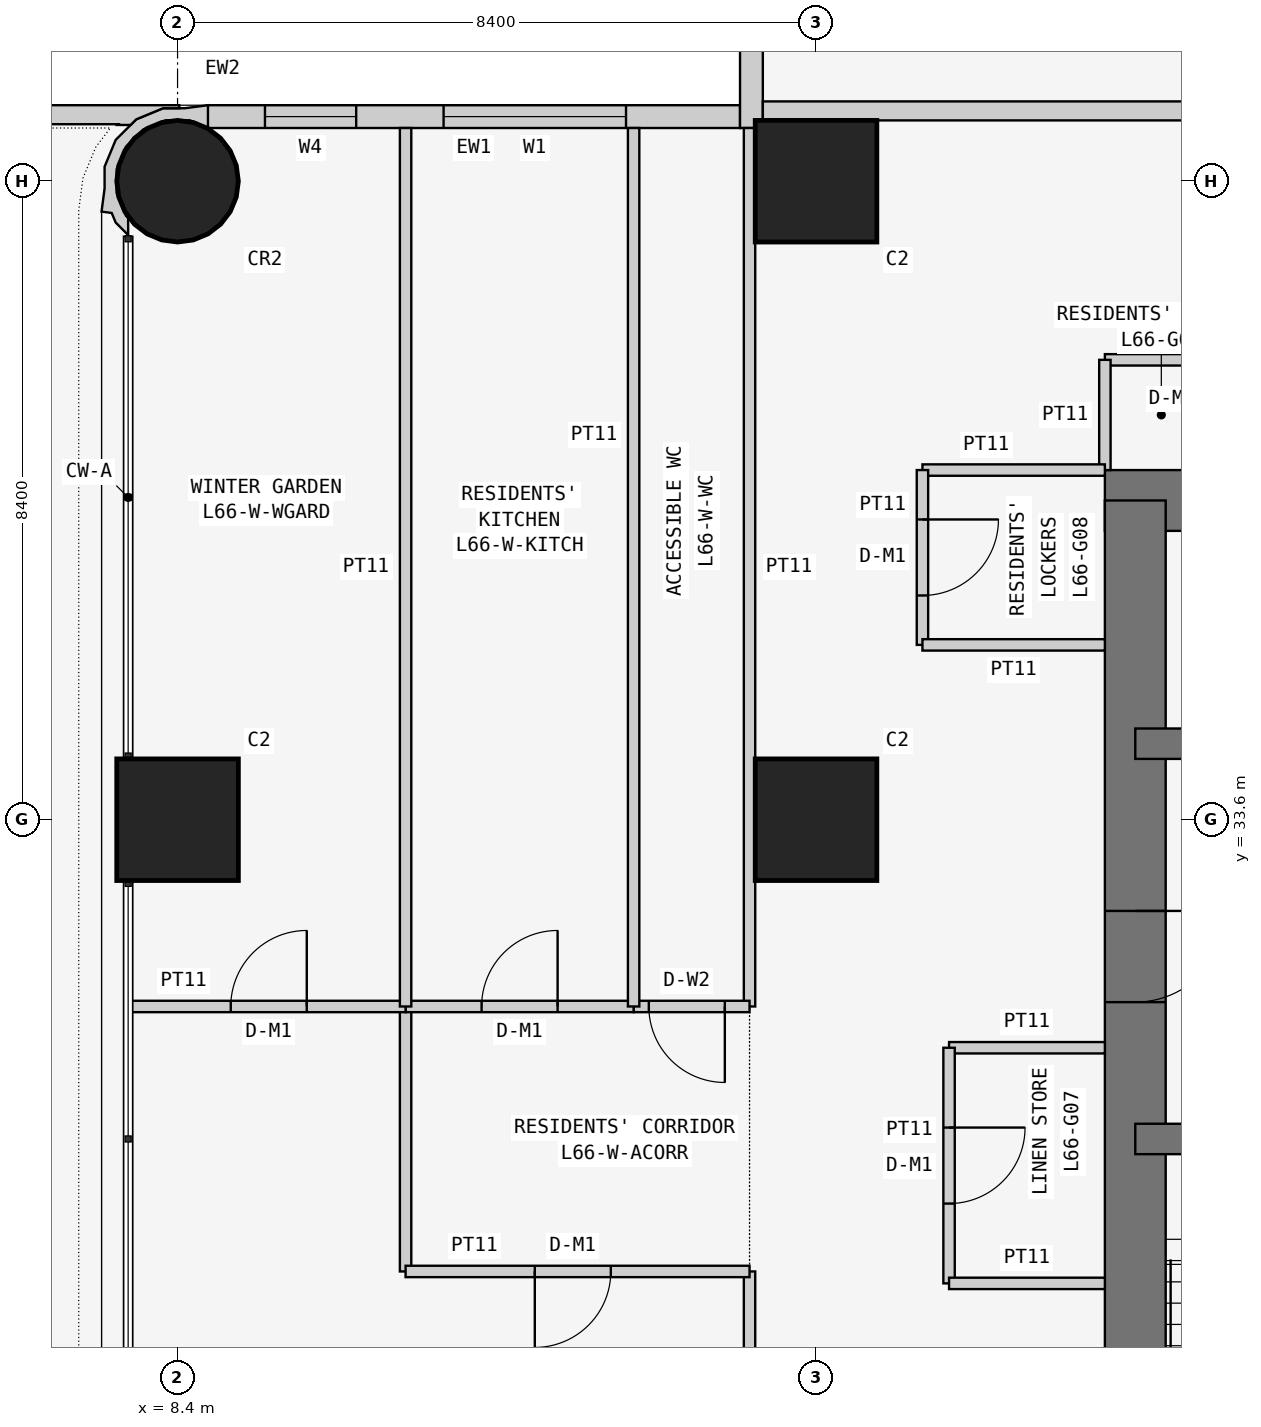
"""IFC4 building model, lengths in metres.
Left out: names, types, materials, properties, quantities, classifications, styles, units other than length and angle.
Written with IfcOpenShell. Run it as: python <this file> out.ifc"""

import sys

from ifc_helpers import new_model, si_unit, direction, frame, frame_2d, origin, origin_2d, place, context, subcontext, project, spatial, polyline, rectangle, circle, outline, extrude, element, fill, save


model = new_model("IFC4")
c1 = context("Model", 3, precision=1e-05, world=origin(), true_north=direction((0.0, 1.0)))
c2 = subcontext(c1, "Body", "Model", "MODEL_VIEW")
j1 = project(units=[si_unit("LENGTHUNIT", "METRE"), si_unit("PLANEANGLEUNIT", "RADIAN")], contexts=[c1])
p1 = place(None, origin())
s1 = spatial("IfcSite", under=j1, at=p1, CompositionType="ELEMENT")
p2 = place(p1, origin())
s2 = spatial("IfcBuilding", under=s1, at=p2, CompositionType="ELEMENT")
p3 = place(p2, frame((0.0, 0.0, 254.1)))
s3 = spatial("IfcBuildingStorey", under=s2, at=p3, CompositionType="ELEMENT", Elevation=254.1)
p4 = place(p3, frame((8.4, 33.6, 0.0), z_axis=(0.0, 0.0, 1.0), x_axis=(1.0, 0.0, 0.0)))
e1 = element("IfcColumn", 1, at=p4, inside=s3, PredefinedType="COLUMN", context=c2, shape_type="SweptSolid", body=[
    extrude(rectangle(XDim=1.6, YDim=1.6, at=origin_2d()), origin(), (0.0, 0.0, 1.0), 3.6),
])
p5 = place(p3, frame((8.4, 42.0, 0.0), z_axis=(0.0, 0.0, 1.0), x_axis=(1.0, 0.0, 0.0)))
e2 = element("IfcColumn", 2, at=p5, inside=s3, PredefinedType="COLUMN", context=c2, shape_type="SweptSolid", body=[
    extrude(circle(Radius=0.8, at=origin_2d()), origin(), (0.0, 0.0, 1.0), 3.6),
])
for number, where, z_axis, x_axis in (
    (3, (16.8, 33.6, 0.0), (0.0, 0.0, 1.0), (1.0, 0.0, 0.0)),
    (4, (16.8, 42.0, 0.0), (0.0, 0.0, 1.0), (1.0, 0.0, 0.0)),
):
    element("IfcColumn", number, at=place(p3, frame(where, z_axis=z_axis, x_axis=x_axis)), inside=s3, PredefinedType="COLUMN", context=c2, shape_type="SweptSolid", body=[
        extrude(rectangle(XDim=1.6, YDim=1.6, at=origin_2d()), origin(), (0.0, 0.0, 1.0), 3.6),
    ])
p6 = place(p3, frame((37.8, 37.8, 0.0), z_axis=(0.0, 0.0, 1.0), x_axis=(-1.0, 0.0, 0.0)))
e5 = element("IfcWall", 5, at=p6, inside=s3, PredefinedType="SHEAR", context=c2, shape_type="SweptSolid", body=[
    extrude(rectangle(XDim=17.2, YDim=0.8, at=frame_2d((8.6, 0.0))), origin(), (0.0, 0.0, 1.0), 3.6),
])
p7 = place(p3, frame((21.0, 37.8, 0.0), z_axis=(0.0, 0.0, 1.0), x_axis=(0.0, -1.0, 0.0)))
e6 = element("IfcWall", 6, at=p7, inside=s3, PredefinedType="SHEAR", context=c2, shape_type="SweptSolid", body=[
    extrude(rectangle(XDim=17.2, YDim=0.8, at=frame_2d((8.6, 0.0))), origin(), (0.0, 0.0, 1.0), 3.6),
])
p8 = place(p7, frame((5.4, 0.0, 0.0)))
e7 = element("IfcOpeningElement", 7, at=p8, cuts=e6, PredefinedType="OPENING", context=c2, shape_type="SweptSolid", body=[
    extrude(rectangle(XDim=1.2, YDim=2.1, at=frame_2d((0.6, 1.05))), frame((0.0, 0.41, 0.0), z_axis=(0.0, -1.0, 0.0), x_axis=(1.0, 0.0, 0.0)), (0.0, 0.0, 1.0), 0.82),
])
p9 = place(p3, frame((21.0, 29.4, 0.0), z_axis=(0.0, 0.0, 1.0), x_axis=(1.0, 0.0, 0.0)))
e8 = element("IfcWall", 8, at=p9, inside=s3, PredefinedType="SHEAR", context=c2, shape_type="SweptSolid", body=[
    extrude(rectangle(XDim=5.6, YDim=0.4, at=frame_2d((2.8, 0.0))), origin(), (0.0, 0.0, 1.0), 3.6),
])
p10 = place(p9, frame((2.3, 0.0, 0.0)))
e9 = element("IfcOpeningElement", 9, at=p10, cuts=e8, PredefinedType="OPENING", context=c2, shape_type="SweptSolid", body=[
    extrude(rectangle(XDim=1.2, YDim=2.1, at=frame_2d((0.6, 1.05))), frame((0.0, 0.21, 0.0), z_axis=(0.0, -1.0, 0.0), x_axis=(1.0, 0.0, 0.0)), (0.0, 0.0, 1.0), 0.42),
])
p11 = place(p3, frame((21.0, 34.6, 0.0), z_axis=(0.0, 0.0, 1.0), x_axis=(1.0, 0.0, 0.0)))
e10 = element("IfcWall", 10, at=p11, inside=s3, PredefinedType="SHEAR", context=c2, shape_type="SweptSolid", body=[
    extrude(rectangle(XDim=11.2, YDim=0.4, at=frame_2d((5.6, 0.0))), origin(), (0.0, 0.0, 1.0), 3.6),
])
p12 = place(p11, frame((9.35, 0.0, 0.0)))
e11 = element("IfcOpeningElement", 11, at=p12, cuts=e10, PredefinedType="OPENING", context=c2, shape_type="SweptSolid", body=[
    extrude(rectangle(XDim=0.9, YDim=2.1, at=frame_2d((0.45, 1.05))), frame((0.0, 0.21, 0.0), z_axis=(0.0, -1.0, 0.0), x_axis=(1.0, 0.0, 0.0)), (0.0, 0.0, 1.0), 0.42),
])
p13 = place(p11, frame((1.0, 0.0, 0.0)))
e12 = element("IfcOpeningElement", 12, at=p13, cuts=e10, PredefinedType="OPENING", context=c2, shape_type="SweptSolid", body=[
    extrude(rectangle(XDim=1.1, YDim=2.1, at=frame_2d((0.55, 1.05))), frame((0.0, 0.21, 0.0), z_axis=(0.0, -1.0, 0.0), x_axis=(1.0, 0.0, 0.0)), (0.0, 0.0, 1.0), 0.42),
])
p14 = place(p11, frame((3.65, 0.0, 0.0)))
e13 = element("IfcOpeningElement", 13, at=p14, cuts=e10, PredefinedType="OPENING", context=c2, shape_type="SweptSolid", body=[
    extrude(rectangle(XDim=1.1, YDim=2.1, at=frame_2d((0.55, 1.05))), frame((0.0, 0.21, 0.0), z_axis=(0.0, -1.0, 0.0), x_axis=(1.0, 0.0, 0.0)), (0.0, 0.0, 1.0), 0.42),
])
p15 = place(p11, frame((6.35, 0.0, 0.0)))
e14 = element("IfcOpeningElement", 14, at=p15, cuts=e10, PredefinedType="OPENING", context=c2, shape_type="SweptSolid", body=[
    extrude(rectangle(XDim=1.3, YDim=2.1, at=frame_2d((0.65, 1.05))), frame((0.0, 0.21, 0.0), z_axis=(0.0, -1.0, 0.0), x_axis=(1.0, 0.0, 0.0)), (0.0, 0.0, 1.0), 0.42),
])
p16 = place(p3, frame((15.8, 42.85, 0.0), z_axis=(0.0, 0.0, 1.0), x_axis=(-1.0, 0.0, 0.0)))
e15 = element("IfcWall", 15, at=p16, inside=s3, PredefinedType="SOLIDWALL", context=c2, shape_type="SweptSolid", body=[
    extrude(rectangle(XDim=7.0, YDim=0.3, at=frame_2d((3.5, 0.0))), origin(), (0.0, 0.0, 1.0), 3.45),
])
p17 = place(p16, frame((1.5, 0.0, 0.9)))
e16 = element("IfcOpeningElement", 16, at=p17, cuts=e15, PredefinedType="OPENING", context=c2, shape_type="SweptSolid", body=[
    extrude(rectangle(XDim=2.4, YDim=1.5, at=frame_2d((1.2, 0.75))), frame((0.0, 0.16, 0.0), z_axis=(0.0, -1.0, 0.0), x_axis=(1.0, 0.0, 0.0)), (0.0, 0.0, 1.0), 0.32),
])
p18 = place(p16, frame((5.05, 0.0, 0.9)))
e17 = element("IfcOpeningElement", 17, at=p18, cuts=e15, PredefinedType="OPENING", context=c2, shape_type="SweptSolid", body=[
    extrude(rectangle(XDim=1.2, YDim=1.5, at=frame_2d((0.6, 0.75))), frame((0.0, 0.16, 0.0), z_axis=(0.0, -1.0, 0.0), x_axis=(1.0, 0.0, 0.0)), (0.0, 0.0, 1.0), 0.32),
])
p19 = place(p3, frame((15.95, 50.0, 0.0), z_axis=(0.0, 0.0, 1.0), x_axis=(0.0, -1.0, 0.0)))
e18 = element("IfcWall", 18, at=p19, inside=s3, PredefinedType="SOLIDWALL", context=c2, shape_type="SweptSolid", body=[
    extrude(rectangle(XDim=7.3, YDim=0.3, at=frame_2d((3.65, 0.0))), origin(), (0.0, 0.0, 1.0), 3.45),
])
p20 = place(p19, frame((3.1, 0.0, 0.9)))
e19 = element("IfcOpeningElement", 19, at=p20, cuts=e18, PredefinedType="OPENING", context=c2, shape_type="SweptSolid", body=[
    extrude(rectangle(XDim=2.4, YDim=1.5, at=frame_2d((1.2, 0.75))), frame((0.0, 0.16, 0.0), z_axis=(0.0, -1.0, 0.0), x_axis=(1.0, 0.0, 0.0)), (0.0, 0.0, 1.0), 0.32),
])
p21 = place(p19, frame((0.75, 0.0, 0.9)))
e20 = element("IfcOpeningElement", 20, at=p21, cuts=e18, PredefinedType="OPENING", context=c2, shape_type="SweptSolid", body=[
    extrude(rectangle(XDim=1.2, YDim=1.5, at=frame_2d((0.6, 0.75))), frame((0.0, 0.16, 0.0), z_axis=(0.0, -1.0, 0.0), x_axis=(1.0, 0.0, 0.0)), (0.0, 0.0, 1.0), 0.32),
])
p22 = place(p3, frame((8.727, 42.817, 0.0), z_axis=(0.0, 0.0, 1.0), x_axis=(-0.93923434088, 0.343276641956, 0.0)))
e21 = element("IfcWall", 21, at=p22, inside=s3, PredefinedType="SOLIDWALL", context=c2, shape_type="SweptSolid", body=[
    extrude(outline(polyline([(-0.127, 0.078), (-0.146, 0.071), (-0.006, -0.197), (0.266, -0.055), (0.535, 0.044), (0.817, 0.302), (0.977, 0.648), (0.994, 1.03), (0.895, 1.3), (0.829, 1.599), (0.697, 1.569), (0.604, 1.67), (0.394, 1.767), (0.471, 1.556), (0.509, 1.539), (0.724, 1.304), (0.833, 1.005), (0.82, 0.687), (0.686, 0.397), (0.451, 0.182), (0.152, 0.073), (-0.116, 0.084), (-0.127, 0.078)])), origin(), (0.0, 0.0, 1.0), 3.45),
])
p23 = place(p3, origin())
e22 = element("IfcWall", 22, at=p23, inside=s3, PredefinedType="PARAPET", context=c2, shape_type="SweptSolid", body=[
    extrude(outline(polyline([(-0.3, 15.988), (-0.59, 16.21), (-0.812, 16.5), (-0.952, 16.838), (-1.0, 17.2), (-1.0, 41.6), (-0.952, 41.962), (-0.812, 42.3), (-0.59, 42.59), (-0.3, 42.812), (0.038, 42.952), (0.4, 43.0), (8.423, 43.0), (8.423, 42.96), (8.209, 42.96), (7.856, 42.814), (7.782, 42.74), (7.61, 42.74), (7.618, 42.75), (0.417, 42.75), (0.103, 42.709), (-0.174, 42.594), (-0.412, 42.412), (-0.594, 42.174), (-0.709, 41.897), (-0.75, 41.583), (-0.75, 17.216), (-0.709, 16.903), (-0.594, 16.626), (-0.412, 16.388), (-0.174, 16.206), (0.103, 16.091), (0.417, 16.05), (7.618, 16.05), (7.61, 16.06), (7.782, 16.06), (7.856, 15.986), (8.209, 15.84), (8.423, 15.84), (8.423, 15.8), (0.4, 15.8), (0.038, 15.848), (-0.3, 15.988)])), origin(), (0.0, 0.0, 1.0), 1.25),
])
p24 = place(p3, frame((24.1, 39.65, 0.0), z_axis=(0.0, 0.0, 1.0), x_axis=(-1.0, 0.0, 0.0)))
e23 = element("IfcWall", 23, at=p24, inside=s3, PredefinedType="PARTITIONING", context=c2, shape_type="SweptSolid", body=[
    extrude(rectangle(XDim=3.5, YDim=0.15, at=frame_2d((1.75, 0.0))), origin(), (0.0, 0.0, 1.0), 3.45),
])
p25 = place(p24, frame((1.25, 0.0, 0.0)))
e24 = element("IfcOpeningElement", 24, at=p25, cuts=e23, PredefinedType="OPENING", context=c2, shape_type="SweptSolid", body=[
    extrude(rectangle(XDim=1.0, YDim=2.1, at=frame_2d((0.5, 1.05))), frame((0.0, 0.085, 0.0), z_axis=(0.0, -1.0, 0.0), x_axis=(1.0, 0.0, 0.0)), (0.0, 0.0, 1.0), 0.17),
])
p26 = place(p3, frame((20.6, 39.65, 0.0), z_axis=(0.0, 0.0, 1.0), x_axis=(0.0, -1.0, 0.0)))
e25 = element("IfcWall", 25, at=p26, inside=s3, PredefinedType="PARTITIONING", context=c2, shape_type="SweptSolid", body=[
    extrude(rectangle(XDim=1.45, YDim=0.15, at=frame_2d((0.725, 0.0))), origin(), (0.0, 0.0, 1.0), 3.45),
])
p27 = place(p3, frame((20.6, 30.6, 0.0), z_axis=(0.0, 0.0, 1.0), x_axis=(-1.0, 0.0, 0.0)))
e26 = element("IfcWall", 26, at=p27, inside=s3, PredefinedType="PARTITIONING", context=c2, shape_type="SweptSolid", body=[
    extrude(rectangle(XDim=2.05, YDim=0.15, at=frame_2d((1.025, 0.0))), origin(), (0.0, 0.0, 1.0), 3.45),
])
p28 = place(p3, frame((18.55, 30.6, 0.0), z_axis=(0.0, 0.0, 1.0), x_axis=(0.0, -1.0, 0.0)))
e27 = element("IfcWall", 27, at=p28, inside=s3, PredefinedType="PARTITIONING", context=c2, shape_type="SweptSolid", body=[
    extrude(rectangle(XDim=3.1, YDim=0.15, at=frame_2d((1.55, 0.0))), origin(), (0.0, 0.0, 1.0), 3.45),
])
p29 = place(p28, frame((1.05, 0.0, 0.0)))
e28 = element("IfcOpeningElement", 28, at=p29, cuts=e27, PredefinedType="OPENING", context=c2, shape_type="SweptSolid", body=[
    extrude(rectangle(XDim=1.0, YDim=2.1, at=frame_2d((0.5, 1.05))), frame((0.0, 0.085, 0.0), z_axis=(0.0, -1.0, 0.0), x_axis=(1.0, 0.0, 0.0)), (0.0, 0.0, 1.0), 0.17),
])
p30 = place(p3, frame((18.55, 27.5, 0.0), z_axis=(0.0, 0.0, 1.0), x_axis=(1.0, 0.0, 0.0)))
e29 = element("IfcWall", 29, at=p30, inside=s3, PredefinedType="PARTITIONING", context=c2, shape_type="SweptSolid", body=[
    extrude(rectangle(XDim=2.05, YDim=0.15, at=frame_2d((1.025, 0.0))), origin(), (0.0, 0.0, 1.0), 3.45),
])
p31 = place(p3, frame((20.6, 38.2, 0.0), z_axis=(0.0, 0.0, 1.0), x_axis=(-1.0, 0.0, 0.0)))
e30 = element("IfcWall", 30, at=p31, inside=s3, PredefinedType="PARTITIONING", context=c2, shape_type="SweptSolid", body=[
    extrude(rectangle(XDim=2.4, YDim=0.15, at=frame_2d((1.2, 0.0))), origin(), (0.0, 0.0, 1.0), 3.45),
])
p32 = place(p3, frame((18.2, 38.2, 0.0), z_axis=(0.0, 0.0, 1.0), x_axis=(0.0, -1.0, 0.0)))
e31 = element("IfcWall", 31, at=p32, inside=s3, PredefinedType="PARTITIONING", context=c2, shape_type="SweptSolid", body=[
    extrude(rectangle(XDim=2.3, YDim=0.15, at=frame_2d((1.15, 0.0))), origin(), (0.0, 0.0, 1.0), 3.45),
])
p33 = place(p32, frame((0.65, 0.0, 0.0)))
e32 = element("IfcOpeningElement", 32, at=p33, cuts=e31, PredefinedType="OPENING", context=c2, shape_type="SweptSolid", body=[
    extrude(rectangle(XDim=1.0, YDim=2.1, at=frame_2d((0.5, 1.05))), frame((0.0, 0.085, 0.0), z_axis=(0.0, -1.0, 0.0), x_axis=(1.0, 0.0, 0.0)), (0.0, 0.0, 1.0), 0.17),
])
p34 = place(p3, frame((18.2, 35.9, 0.0), z_axis=(0.0, 0.0, 1.0), x_axis=(1.0, 0.0, 0.0)))
e33 = element("IfcWall", 33, at=p34, inside=s3, PredefinedType="PARTITIONING", context=c2, shape_type="SweptSolid", body=[
    extrude(rectangle(XDim=2.4, YDim=0.15, at=frame_2d((1.2, 0.0))), origin(), (0.0, 0.0, 1.0), 3.45),
])
p35 = place(p3, frame((16.1, 42.925, 0.0), z_axis=(0.0, 0.0, 1.0), x_axis=(1.0, 0.0, 0.0)))
e34 = element("IfcWall", 34, at=p35, inside=s3, PredefinedType="PARTITIONING", context=c2, shape_type="SweptSolid", body=[
    extrude(rectangle(XDim=6.871, YDim=0.25, at=frame_2d((3.436, 0.0))), origin(), (0.0, 0.0, 1.0), 3.45),
])
for number, where, z_axis, x_axis in (
    (35, (15.925, 16.1, 0.0), (0.0, 0.0, 1.0), (0.0, 1.0, 0.0)),
    (36, (15.925, 31.143, 0.0), (0.0, 0.0, 1.0), (0.0, 1.0, 0.0)),
):
    element("IfcWall", number, at=place(p3, frame(where, z_axis=z_axis, x_axis=x_axis)), inside=s3, PredefinedType="PARTITIONING", context=c2, shape_type="SweptSolid", body=[
        extrude(rectangle(XDim=11.557, YDim=0.15, at=frame_2d((5.778, 0.0))), origin(), (0.0, 0.0, 1.0), 3.45),
    ])
p36 = place(p3, frame((11.4, 31.143, 0.0), z_axis=(0.0, 0.0, 1.0), x_axis=(0.0, -1.0, 0.0)))
e37 = element("IfcWall", 37, at=p36, inside=s3, PredefinedType="PARTITIONING", context=c2, shape_type="SweptSolid", body=[
    extrude(rectangle(XDim=3.486, YDim=0.15, at=frame_2d((1.743, 0.0))), origin(), (0.0, 0.0, 1.0), 3.45),
])
p37 = place(p3, frame((11.4, 27.657, 0.0), z_axis=(0.0, 0.0, 1.0), x_axis=(1.0, 0.0, 0.0)))
e38 = element("IfcWall", 38, at=p37, inside=s3, PredefinedType="PARTITIONING", context=c2, shape_type="SweptSolid", body=[
    extrude(rectangle(XDim=4.525, YDim=0.15, at=frame_2d((2.263, 0.0))), origin(), (0.0, 0.0, 1.0), 3.45),
])
p38 = place(p37, frame((1.7, 0.0, 0.0)))
e39 = element("IfcOpeningElement", 39, at=p38, cuts=e38, PredefinedType="OPENING", context=c2, shape_type="SweptSolid", body=[
    extrude(rectangle(XDim=1.0, YDim=2.1, at=frame_2d((0.5, 1.05))), frame((0.0, 0.085, 0.0), z_axis=(0.0, -1.0, 0.0), x_axis=(1.0, 0.0, 0.0)), (0.0, 0.0, 1.0), 0.17),
])
p39 = place(p3, frame((15.925, 31.143, 0.0), z_axis=(0.0, 0.0, 1.0), x_axis=(-1.0, 0.0, 0.0)))
e40 = element("IfcWall", 40, at=p39, inside=s3, PredefinedType="PARTITIONING", context=c2, shape_type="SweptSolid", body=[
    extrude(rectangle(XDim=1.525, YDim=0.15, at=frame_2d((0.763, 0.0))), origin(), (0.0, 0.0, 1.0), 3.45),
])
p40 = place(p39, frame((0.325, 0.0, 0.0)))
e41 = element("IfcOpeningElement", 41, at=p40, cuts=e40, PredefinedType="OPENING", context=c2, shape_type="SweptSolid", body=[
    extrude(rectangle(XDim=1.0, YDim=2.1, at=frame_2d((0.5, 1.05))), frame((0.0, 0.085, 0.0), z_axis=(0.0, -1.0, 0.0), x_axis=(1.0, 0.0, 0.0)), (0.0, 0.0, 1.0), 0.17),
])
p41 = place(p3, frame((14.4, 31.143, 0.0), z_axis=(0.0, 0.0, 1.0), x_axis=(-1.0, 0.0, 0.0)))
e42 = element("IfcWall", 42, at=p41, inside=s3, PredefinedType="PARTITIONING", context=c2, shape_type="SweptSolid", body=[
    extrude(rectangle(XDim=3.0, YDim=0.15, at=frame_2d((1.5, 0.0))), origin(), (0.0, 0.0, 1.0), 3.45),
])
p42 = place(p41, frame((1.0, 0.0, 0.0)))
e43 = element("IfcOpeningElement", 43, at=p42, cuts=e42, PredefinedType="OPENING", context=c2, shape_type="SweptSolid", body=[
    extrude(rectangle(XDim=1.0, YDim=2.1, at=frame_2d((0.5, 1.05))), frame((0.0, 0.085, 0.0), z_axis=(0.0, -1.0, 0.0), x_axis=(1.0, 0.0, 0.0)), (0.0, 0.0, 1.0), 0.17),
])
p43 = place(p3, frame((7.75, 31.143, 0.0), z_axis=(0.0, 0.0, 1.0), x_axis=(1.0, 0.0, 0.0)))
e44 = element("IfcWall", 44, at=p43, inside=s3, PredefinedType="PARTITIONING", context=c2, shape_type="SweptSolid", body=[
    extrude(rectangle(XDim=3.65, YDim=0.15, at=frame_2d((1.825, 0.0))), origin(), (0.0, 0.0, 1.0), 3.45),
])
p44 = place(p43, frame((1.35, 0.0, 0.0)))
e45 = element("IfcOpeningElement", 45, at=p44, cuts=e44, PredefinedType="OPENING", context=c2, shape_type="SweptSolid", body=[
    extrude(rectangle(XDim=1.0, YDim=2.1, at=frame_2d((0.5, 1.05))), frame((0.0, 0.085, 0.0), z_axis=(0.0, -1.0, 0.0), x_axis=(1.0, 0.0, 0.0)), (0.0, 0.0, 1.0), 0.17),
])
for number, where, z_axis, x_axis in (
    (46, (14.4, 42.7, 0.0), (0.0, 0.0, 1.0), (0.0, -1.0, 0.0)),
    (47, (11.4, 42.7, 0.0), (0.0, 0.0, 1.0), (0.0, -1.0, 0.0)),
):
    element("IfcWall", number, at=place(p3, frame(where, z_axis=z_axis, x_axis=x_axis)), inside=s3, PredefinedType="PARTITIONING", context=c2, shape_type="SweptSolid", body=[
        extrude(rectangle(XDim=11.557, YDim=0.15, at=frame_2d((5.778, 0.0))), origin(), (0.0, 0.0, 1.0), 3.45),
    ])
p45 = place(p17, origin())
e48 = element("IfcWindow", 48, at=p45, inside=s3, PartitioningType="SINGLE_PANEL", PredefinedType="WINDOW", context=c2, shape_type="SweptSolid", body=[
    extrude(rectangle(XDim=2.4, YDim=1.5, at=frame_2d((1.2, 0.75))), frame((0.0, 0.03, 0.0), z_axis=(0.0, -1.0, 0.0), x_axis=(1.0, 0.0, 0.0)), (0.0, 0.0, 1.0), 0.06),
])
fill(e16, e48)
p46 = place(p18, origin())
e49 = element("IfcWindow", 49, at=p46, inside=s3, PartitioningType="SINGLE_PANEL", PredefinedType="WINDOW", context=c2, shape_type="SweptSolid", body=[
    extrude(rectangle(XDim=1.2, YDim=1.5, at=frame_2d((0.6, 0.75))), frame((0.0, 0.03, 0.0), z_axis=(0.0, -1.0, 0.0), x_axis=(1.0, 0.0, 0.0)), (0.0, 0.0, 1.0), 0.06),
])
fill(e17, e49)
p47 = place(p29, origin())
e50 = element("IfcDoor", 50, at=p47, inside=s3, OperationType="SINGLE_SWING_LEFT", PredefinedType="DOOR", context=c2, shape_type="SweptSolid", body=[
    extrude(rectangle(XDim=1.0, YDim=2.1, at=frame_2d((0.5, 1.05))), frame((0.0, 0.025, 0.0), z_axis=(0.0, -1.0, 0.0), x_axis=(1.0, 0.0, 0.0)), (0.0, 0.0, 1.0), 0.05),
])
fill(e28, e50)
p48 = place(p33, origin())
e51 = element("IfcDoor", 51, at=p48, inside=s3, OperationType="SINGLE_SWING_LEFT", PredefinedType="DOOR", context=c2, shape_type="SweptSolid", body=[
    extrude(rectangle(XDim=1.0, YDim=2.1, at=frame_2d((0.5, 1.05))), frame((0.0, 0.025, 0.0), z_axis=(0.0, -1.0, 0.0), x_axis=(1.0, 0.0, 0.0)), (0.0, 0.0, 1.0), 0.05),
])
fill(e32, e51)
p49 = place(p38, frame((1.0, 0.0, 0.0), z_axis=(0.0, 0.0, 1.0), x_axis=(-1.0, 0.0, 0.0)))
e52 = element("IfcDoor", 52, at=p49, inside=s3, OperationType="SINGLE_SWING_RIGHT", PredefinedType="DOOR", context=c2, shape_type="SweptSolid", body=[
    extrude(rectangle(XDim=1.0, YDim=2.1, at=frame_2d((0.5, 1.05))), frame((0.0, 0.025, 0.0), z_axis=(0.0, -1.0, 0.0), x_axis=(1.0, 0.0, 0.0)), (0.0, 0.0, 1.0), 0.05),
])
fill(e39, e52)
p50 = place(p40, origin())
e53 = element("IfcDoor", 53, at=p50, inside=s3, OperationType="SINGLE_SWING_LEFT", PredefinedType="DOOR", context=c2, shape_type="SweptSolid", body=[
    extrude(rectangle(XDim=1.0, YDim=2.1, at=frame_2d((0.5, 1.05))), frame((0.0, 0.025, 0.0), z_axis=(0.0, -1.0, 0.0), x_axis=(1.0, 0.0, 0.0)), (0.0, 0.0, 1.0), 0.05),
])
fill(e41, e53)
p51 = place(p42, frame((1.0, 0.0, 0.0), z_axis=(0.0, 0.0, 1.0), x_axis=(-1.0, 0.0, 0.0)))
e54 = element("IfcDoor", 54, at=p51, inside=s3, OperationType="SINGLE_SWING_RIGHT", PredefinedType="DOOR", context=c2, shape_type="SweptSolid", body=[
    extrude(rectangle(XDim=1.0, YDim=2.1, at=frame_2d((0.5, 1.05))), frame((0.0, 0.025, 0.0), z_axis=(0.0, -1.0, 0.0), x_axis=(1.0, 0.0, 0.0)), (0.0, 0.0, 1.0), 0.05),
])
fill(e43, e54)
p52 = place(p44, origin())
e55 = element("IfcDoor", 55, at=p52, inside=s3, OperationType="SINGLE_SWING_RIGHT", PredefinedType="DOOR", context=c2, shape_type="SweptSolid", body=[
    extrude(rectangle(XDim=1.0, YDim=2.1, at=frame_2d((0.5, 1.05))), frame((0.0, 0.025, 0.0), z_axis=(0.0, -1.0, 0.0), x_axis=(1.0, 0.0, 0.0)), (0.0, 0.0, 1.0), 0.05),
])
fill(e45, e55)
p53 = place(p8, origin())
e56 = element("IfcDoor", 56, at=p53, inside=s3, OperationType="SINGLE_SWING_LEFT", PredefinedType="DOOR", context=c2, shape_type="SweptSolid", body=[
    extrude(rectangle(XDim=1.2, YDim=2.1, at=frame_2d((0.6, 1.05))), frame((0.0, 0.025, 0.0), z_axis=(0.0, -1.0, 0.0), x_axis=(1.0, 0.0, 0.0)), (0.0, 0.0, 1.0), 0.05),
])
fill(e7, e56)
save(model, sys.argv[1])
